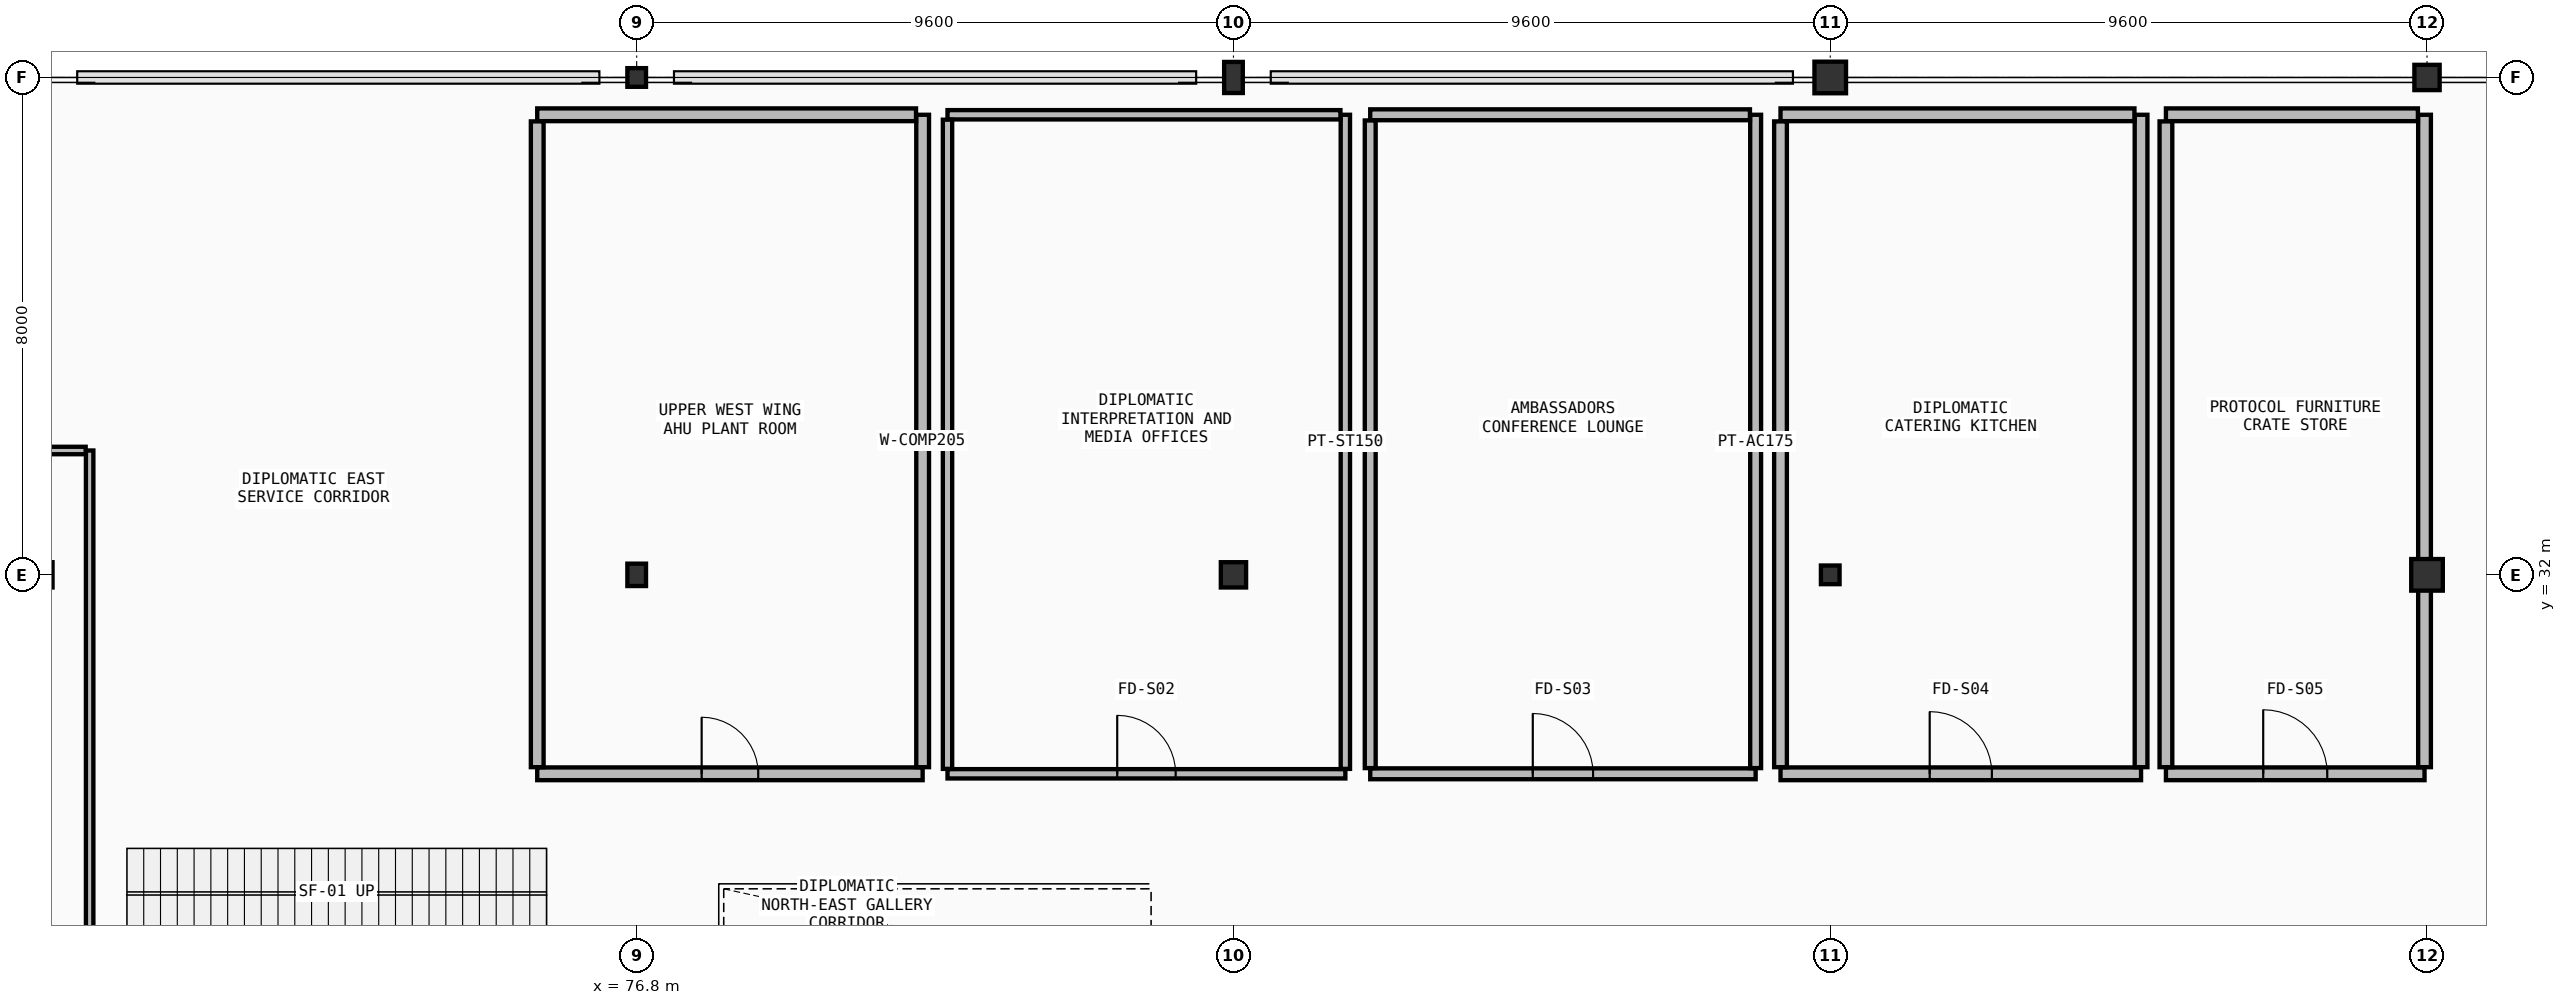
"""IFC4 building model, lengths in metres.
Left out: names, types, materials, properties, quantities, classifications, styles, units other than length and angle.
Written with IfcOpenShell. Run it as: python <this file> out.ifc"""

import sys

from ifc_helpers import new_model, si_unit, direction, frame, frame_2d, origin, origin_2d, place, context, subcontext, project, spatial, rectangle, hollow_circle, i_section, extrude, element, fill, save


model = new_model("IFC4")
c1 = context("Model", 3, precision=1e-05, world=origin(), true_north=direction((0.0, 1.0)))
c2 = subcontext(c1, "Body", "Model", "MODEL_VIEW")
j1 = project(units=[si_unit("LENGTHUNIT", "METRE"), si_unit("PLANEANGLEUNIT", "RADIAN")], contexts=[c1])
p1 = place(None, origin())
s1 = spatial("IfcSite", under=j1, at=p1, CompositionType="ELEMENT")
p2 = place(p1, origin())
s2 = spatial("IfcBuilding", under=s1, at=p2, CompositionType="ELEMENT")
p3 = place(p2, frame((0.0, 0.0, 20.4)))
s3 = spatial("IfcBuildingStorey", under=s2, at=p3, CompositionType="ELEMENT", Elevation=20.4)
p4 = place(p3, frame((67.2, 32.0, 0.0), z_axis=(0.0, 0.0, 1.0), x_axis=(1.0, 0.0, 0.0)))
e1 = element("IfcColumn", 1, at=p4, inside=s3, PredefinedType="COLUMN", context=c2, shape_type="SweptSolid", body=[
    extrude(hollow_circle(Radius=0.203, WallThickness=0.02, at=origin_2d()), origin(), (0.0, 0.0, 1.0), 4.5),
])
p5 = place(p3, frame((76.8, 32.0, 0.0), z_axis=(0.0, 0.0, 1.0), x_axis=(1.0, 0.0, 0.0)))
e2 = element("IfcColumn", 2, at=p5, inside=s3, PredefinedType="COLUMN", context=c2, shape_type="SweptSolid", body=[
    extrude(i_section(OverallWidth=0.3, OverallDepth=0.36, WebThickness=0.012, FlangeThickness=0.022, FilletRadius=0.027, at=origin_2d()), origin(), (0.0, 0.0, 1.0), 4.5),
])
p6 = place(p3, frame((76.8, 40.0, 0.0), z_axis=(0.0, 0.0, 1.0), x_axis=(1.0, 0.0, 0.0)))
e3 = element("IfcColumn", 3, at=p6, inside=s3, PredefinedType="COLUMN", context=c2, shape_type="SweptSolid", body=[
    extrude(i_section(OverallWidth=0.3, OverallDepth=0.3, WebThickness=0.011, FlangeThickness=0.019, FilletRadius=0.027, at=origin_2d()), origin(), (0.0, 0.0, 1.0), 4.5),
])
p7 = place(p3, frame((86.4, 32.0, 0.0), z_axis=(0.0, 0.0, 1.0), x_axis=(1.0, 0.0, 0.0)))
e4 = element("IfcColumn", 4, at=p7, inside=s3, PredefinedType="COLUMN", context=c2, shape_type="SweptSolid", body=[
    extrude(hollow_circle(Radius=0.203, WallThickness=0.02, at=origin_2d()), origin(), (0.0, 0.0, 1.0), 4.5),
])
p8 = place(p3, frame((86.4, 40.0, 0.0), z_axis=(0.0, 0.0, 1.0), x_axis=(1.0, 0.0, 0.0)))
e5 = element("IfcColumn", 5, at=p8, inside=s3, PredefinedType="COLUMN", context=c2, shape_type="SweptSolid", body=[
    extrude(i_section(OverallWidth=0.3, OverallDepth=0.5, WebThickness=0.014, FlangeThickness=0.028, FilletRadius=0.027, at=origin_2d()), origin(), (0.0, 0.0, 1.0), 4.5),
])
p9 = place(p3, frame((96.0, 32.0, 0.0), z_axis=(0.0, 0.0, 1.0), x_axis=(1.0, 0.0, 0.0)))
e6 = element("IfcColumn", 6, at=p9, inside=s3, PredefinedType="COLUMN", context=c2, shape_type="SweptSolid", body=[
    extrude(i_section(OverallWidth=0.3, OverallDepth=0.3, WebThickness=0.011, FlangeThickness=0.019, FilletRadius=0.027, at=origin_2d()), origin(), (0.0, 0.0, 1.0), 4.5),
])
for number, where, z_axis, x_axis in (
    (7, (96.0, 40.0, 0.0), (0.0, 0.0, 1.0), (1.0, 0.0, 0.0)),
    (8, (105.6, 32.0, 0.0), (0.0, 0.0, 1.0), (1.0, 0.0, 0.0)),
):
    element("IfcColumn", number, at=place(p3, frame(where, z_axis=z_axis, x_axis=x_axis)), inside=s3, PredefinedType="COLUMN", context=c2, shape_type="SweptSolid", body=[
        extrude(hollow_circle(Radius=0.254, WallThickness=0.025, at=origin_2d()), origin(), (0.0, 0.0, 1.0), 4.5),
    ])
p10 = place(p3, frame((105.6, 40.0, 0.0), z_axis=(0.0, 0.0, 1.0), x_axis=(1.0, 0.0, 0.0)))
e9 = element("IfcColumn", 9, at=p10, inside=s3, PredefinedType="COLUMN", context=c2, shape_type="SweptSolid", body=[
    extrude(hollow_circle(Radius=0.203, WallThickness=0.02, at=origin_2d()), origin(), (0.0, 0.0, 1.0), 4.5),
])
p11 = place(p3, frame((75.2, 28.8, 0.0), z_axis=(0.0, 0.0, 1.0), x_axis=(1.0, 0.0, 0.0)))
e10 = element("IfcWall", 10, at=p11, inside=s3, PredefinedType="SOLIDWALL", context=c2, shape_type="SweptSolid", body=[
    extrude(rectangle(XDim=6.2, YDim=0.205, at=frame_2d((3.1, 0.0))), origin(), (0.0, 0.0, 1.0), 3.67),
])
p12 = place(p11, frame((2.645, 0.0, 0.0)))
e11 = element("IfcOpeningElement", 11, at=p12, cuts=e10, PredefinedType="OPENING", context=c2, shape_type="SweptSolid", body=[
    extrude(rectangle(XDim=0.91, YDim=2.08, at=frame_2d((0.455, 1.04))), frame((0.0, 0.113, 0.0), z_axis=(0.0, -1.0, 0.0), x_axis=(1.0, 0.0, 0.0)), (0.0, 0.0, 1.0), 0.225),
])
p13 = place(p3, frame((81.4, 28.906, 0.0), z_axis=(0.0, 0.0, 1.0), x_axis=(0.0, 1.0, 0.0)))
e12 = element("IfcWall", 12, at=p13, inside=s3, PredefinedType="SOLIDWALL", context=c2, shape_type="SweptSolid", body=[
    extrude(rectangle(XDim=10.493, YDim=0.205, at=frame_2d((5.247, 0.0))), origin(), (0.0, 0.0, 1.0), 3.63),
])
p14 = place(p3, frame((81.293, 39.4, 0.0), z_axis=(0.0, 0.0, 1.0), x_axis=(-1.0, 0.0, 0.0)))
e13 = element("IfcWall", 13, at=p14, inside=s3, PredefinedType="SOLIDWALL", context=c2, shape_type="SweptSolid", body=[
    extrude(rectangle(XDim=6.094, YDim=0.205, at=frame_2d((3.047, 0.0))), origin(), (0.0, 0.0, 1.0), 3.32),
])
p15 = place(p3, frame((75.2, 39.293, 0.0), z_axis=(0.0, 0.0, 1.0), x_axis=(0.0, -1.0, 0.0)))
e14 = element("IfcWall", 14, at=p15, inside=s3, PredefinedType="SOLIDWALL", context=c2, shape_type="SweptSolid", body=[
    extrude(rectangle(XDim=10.387, YDim=0.205, at=frame_2d((5.193, 0.0))), origin(), (0.0, 0.0, 1.0), 3.77),
])
p16 = place(p3, frame((81.8, 28.8, 0.0), z_axis=(0.0, 0.0, 1.0), x_axis=(1.0, 0.0, 0.0)))
e15 = element("IfcWall", 15, at=p16, inside=s3, PredefinedType="PARTITIONING", context=c2, shape_type="SweptSolid", body=[
    extrude(rectangle(XDim=6.4, YDim=0.15, at=frame_2d((3.2, 0.0))), origin(), (0.0, 0.0, 1.0), 3.32),
])
p17 = place(p16, frame((2.73, 0.0, 0.0)))
e16 = element("IfcOpeningElement", 16, at=p17, cuts=e15, PredefinedType="OPENING", context=c2, shape_type="SweptSolid", body=[
    extrude(rectangle(XDim=0.94, YDim=2.1, at=frame_2d((0.47, 1.05))), frame((0.0, 0.085, 0.0), z_axis=(0.0, -1.0, 0.0), x_axis=(1.0, 0.0, 0.0)), (0.0, 0.0, 1.0), 0.17),
])
p18 = place(p3, frame((88.2, 28.879, 0.0), z_axis=(0.0, 0.0, 1.0), x_axis=(0.0, 1.0, 0.0)))
e17 = element("IfcWall", 17, at=p18, inside=s3, PredefinedType="PARTITIONING", context=c2, shape_type="SweptSolid", body=[
    extrude(rectangle(XDim=10.521, YDim=0.15, at=frame_2d((5.26, 0.0))), origin(), (0.0, 0.0, 1.0), 3.73),
])
p19 = place(p3, frame((88.121, 39.4, 0.0), z_axis=(0.0, 0.0, 1.0), x_axis=(-1.0, 0.0, 0.0)))
e18 = element("IfcWall", 18, at=p19, inside=s3, PredefinedType="PARTITIONING", context=c2, shape_type="SweptSolid", body=[
    extrude(rectangle(XDim=6.321, YDim=0.15, at=frame_2d((3.161, 0.0))), origin(), (0.0, 0.0, 1.0), 3.52),
])
p20 = place(p3, frame((81.8, 39.321, 0.0), z_axis=(0.0, 0.0, 1.0), x_axis=(0.0, -1.0, 0.0)))
e19 = element("IfcWall", 19, at=p20, inside=s3, PredefinedType="PARTITIONING", context=c2, shape_type="SweptSolid", body=[
    extrude(rectangle(XDim=10.442, YDim=0.15, at=frame_2d((5.221, 0.0))), origin(), (0.0, 0.0, 1.0), 3.63),
])
p21 = place(p3, frame((88.6, 28.8, 0.0), z_axis=(0.0, 0.0, 1.0), x_axis=(1.0, 0.0, 0.0)))
e20 = element("IfcWall", 20, at=p21, inside=s3, PredefinedType="PARTITIONING", context=c2, shape_type="SweptSolid", body=[
    extrude(rectangle(XDim=6.2, YDim=0.175, at=frame_2d((3.1, 0.0))), origin(), (0.0, 0.0, 1.0), 4.25),
])
p22 = place(p21, frame((2.615, 0.0, 0.0)))
e21 = element("IfcOpeningElement", 21, at=p22, cuts=e20, PredefinedType="OPENING", context=c2, shape_type="SweptSolid", body=[
    extrude(rectangle(XDim=0.97, YDim=2.1, at=frame_2d((0.485, 1.05))), frame((0.0, 0.097, 0.0), z_axis=(0.0, -1.0, 0.0), x_axis=(1.0, 0.0, 0.0)), (0.0, 0.0, 1.0), 0.195),
])
p23 = place(p3, frame((94.8, 28.892, 0.0), z_axis=(0.0, 0.0, 1.0), x_axis=(0.0, 1.0, 0.0)))
e22 = element("IfcWall", 22, at=p23, inside=s3, PredefinedType="PARTITIONING", context=c2, shape_type="SweptSolid", body=[
    extrude(rectangle(XDim=10.508, YDim=0.175, at=frame_2d((5.254, 0.0))), origin(), (0.0, 0.0, 1.0), 3.73),
])
p24 = place(p3, frame((94.708, 39.4, 0.0), z_axis=(0.0, 0.0, 1.0), x_axis=(-1.0, 0.0, 0.0)))
e23 = element("IfcWall", 23, at=p24, inside=s3, PredefinedType="PARTITIONING", context=c2, shape_type="SweptSolid", body=[
    extrude(rectangle(XDim=6.108, YDim=0.175, at=frame_2d((3.054, 0.0))), origin(), (0.0, 0.0, 1.0), 4.25),
])
p25 = place(p3, frame((88.6, 39.309, 0.0), z_axis=(0.0, 0.0, 1.0), x_axis=(0.0, -1.0, 0.0)))
e24 = element("IfcWall", 24, at=p25, inside=s3, PredefinedType="PARTITIONING", context=c2, shape_type="SweptSolid", body=[
    extrude(rectangle(XDim=10.417, YDim=0.175, at=frame_2d((5.208, 0.0))), origin(), (0.0, 0.0, 1.0), 3.73),
])
p26 = place(p3, frame((95.2, 28.8, 0.0), z_axis=(0.0, 0.0, 1.0), x_axis=(1.0, 0.0, 0.0)))
e25 = element("IfcWall", 25, at=p26, inside=s3, PredefinedType="SOLIDWALL", context=c2, shape_type="SweptSolid", body=[
    extrude(rectangle(XDim=5.8, YDim=0.205, at=frame_2d((2.9, 0.0))), origin(), (0.0, 0.0, 1.0), 3.52),
])
p27 = place(p26, frame((2.4, 0.0, 0.0)))
e26 = element("IfcOpeningElement", 26, at=p27, cuts=e25, PredefinedType="OPENING", context=c2, shape_type="SweptSolid", body=[
    extrude(rectangle(XDim=1.0, YDim=2.12, at=frame_2d((0.5, 1.06))), frame((0.0, 0.113, 0.0), z_axis=(0.0, -1.0, 0.0), x_axis=(1.0, 0.0, 0.0)), (0.0, 0.0, 1.0), 0.225),
])
p28 = place(p3, frame((101.0, 28.906, 0.0), z_axis=(0.0, 0.0, 1.0), x_axis=(0.0, 1.0, 0.0)))
e27 = element("IfcWall", 27, at=p28, inside=s3, PredefinedType="SOLIDWALL", context=c2, shape_type="SweptSolid", body=[
    extrude(rectangle(XDim=10.493, YDim=0.205, at=frame_2d((5.247, 0.0))), origin(), (0.0, 0.0, 1.0), 3.84),
])
p29 = place(p3, frame((100.894, 39.4, 0.0), z_axis=(0.0, 0.0, 1.0), x_axis=(-1.0, 0.0, 0.0)))
e28 = element("IfcWall", 28, at=p29, inside=s3, PredefinedType="SOLIDWALL", context=c2, shape_type="SweptSolid", body=[
    extrude(rectangle(XDim=5.694, YDim=0.205, at=frame_2d((2.847, 0.0))), origin(), (0.0, 0.0, 1.0), 3.62),
])
p30 = place(p3, frame((95.2, 39.293, 0.0), z_axis=(0.0, 0.0, 1.0), x_axis=(0.0, -1.0, 0.0)))
e29 = element("IfcWall", 29, at=p30, inside=s3, PredefinedType="SOLIDWALL", context=c2, shape_type="SweptSolid", body=[
    extrude(rectangle(XDim=10.387, YDim=0.205, at=frame_2d((5.193, 0.0))), origin(), (0.0, 0.0, 1.0), 3.73),
])
p31 = place(p3, frame((101.4, 28.8, 0.0), z_axis=(0.0, 0.0, 1.0), x_axis=(1.0, 0.0, 0.0)))
e30 = element("IfcWall", 30, at=p31, inside=s3, PredefinedType="SOLIDWALL", context=c2, shape_type="SweptSolid", body=[
    extrude(rectangle(XDim=4.16, YDim=0.205, at=frame_2d((2.08, 0.0))), origin(), (0.0, 0.0, 1.0), 3.83),
])
p32 = place(p31, frame((1.565, 0.0, 0.0)))
e31 = element("IfcOpeningElement", 31, at=p32, cuts=e30, PredefinedType="OPENING", context=c2, shape_type="SweptSolid", body=[
    extrude(rectangle(XDim=1.03, YDim=2.14, at=frame_2d((0.515, 1.07))), frame((0.0, 0.113, 0.0), z_axis=(0.0, -1.0, 0.0), x_axis=(1.0, 0.0, 0.0)), (0.0, 0.0, 1.0), 0.225),
])
p33 = place(p3, frame((105.56, 28.906, 0.0), z_axis=(0.0, 0.0, 1.0), x_axis=(0.0, 1.0, 0.0)))
e32 = element("IfcWall", 32, at=p33, inside=s3, PredefinedType="SOLIDWALL", context=c2, shape_type="SweptSolid", body=[
    extrude(rectangle(XDim=10.493, YDim=0.205, at=frame_2d((5.247, 0.0))), origin(), (0.0, 0.0, 1.0), 3.78),
])
p34 = place(p3, frame((105.454, 39.4, 0.0), z_axis=(0.0, 0.0, 1.0), x_axis=(-1.0, 0.0, 0.0)))
e33 = element("IfcWall", 33, at=p34, inside=s3, PredefinedType="SOLIDWALL", context=c2, shape_type="SweptSolid", body=[
    extrude(rectangle(XDim=4.054, YDim=0.205, at=frame_2d((2.027, 0.0))), origin(), (0.0, 0.0, 1.0), 4.26),
])
p35 = place(p3, frame((101.4, 39.293, 0.0), z_axis=(0.0, 0.0, 1.0), x_axis=(0.0, -1.0, 0.0)))
e34 = element("IfcWall", 34, at=p35, inside=s3, PredefinedType="SOLIDWALL", context=c2, shape_type="SweptSolid", body=[
    extrude(rectangle(XDim=10.387, YDim=0.205, at=frame_2d((5.193, 0.0))), origin(), (0.0, 0.0, 1.0), 3.84),
])
p36 = place(p3, frame((68.0, 24.664, 0.0), z_axis=(0.0, 0.0, 1.0), x_axis=(0.0, 1.0, 0.0)))
e35 = element("IfcWall", 35, at=p36, inside=s3, PredefinedType="PARTITIONING", context=c2, shape_type="SweptSolid", body=[
    extrude(rectangle(XDim=9.336, YDim=0.12, at=frame_2d((4.668, 0.0))), origin(), (0.0, 0.0, 1.0), 3.77),
])
p37 = place(p3, frame((67.936, 34.0, 0.0), z_axis=(0.0, 0.0, 1.0), x_axis=(-1.0, 0.0, 0.0)))
e36 = element("IfcWall", 36, at=p37, inside=s3, PredefinedType="PARTITIONING", context=c2, shape_type="SweptSolid", body=[
    extrude(rectangle(XDim=7.072, YDim=0.12, at=frame_2d((3.536, 0.0))), origin(), (0.0, 0.0, 1.0), 3.67),
])
p38 = place(p12, origin())
e37 = element("IfcDoor", 37, at=p38, inside=s3, OperationType="SINGLE_SWING_RIGHT", PredefinedType="DOOR", context=c2, shape_type="SweptSolid", body=[
    extrude(rectangle(XDim=0.91, YDim=2.08, at=frame_2d((0.455, 1.04))), frame((0.0, 0.025, 0.0), z_axis=(0.0, -1.0, 0.0), x_axis=(1.0, 0.0, 0.0)), (0.0, 0.0, 1.0), 0.05),
])
fill(e11, e37)
p39 = place(p17, origin())
e38 = element("IfcDoor", 38, at=p39, inside=s3, OperationType="SINGLE_SWING_LEFT", PredefinedType="DOOR", context=c2, shape_type="SweptSolid", body=[
    extrude(rectangle(XDim=0.94, YDim=2.1, at=frame_2d((0.47, 1.05))), frame((0.0, 0.025, 0.0), z_axis=(0.0, -1.0, 0.0), x_axis=(1.0, 0.0, 0.0)), (0.0, 0.0, 1.0), 0.05),
])
fill(e16, e38)
p40 = place(p22, origin())
e39 = element("IfcDoor", 39, at=p40, inside=s3, OperationType="SINGLE_SWING_RIGHT", PredefinedType="DOOR", context=c2, shape_type="SweptSolid", body=[
    extrude(rectangle(XDim=0.97, YDim=2.1, at=frame_2d((0.485, 1.05))), frame((0.0, 0.025, 0.0), z_axis=(0.0, -1.0, 0.0), x_axis=(1.0, 0.0, 0.0)), (0.0, 0.0, 1.0), 0.05),
])
fill(e21, e39)
p41 = place(p27, origin())
e40 = element("IfcDoor", 40, at=p41, inside=s3, OperationType="SINGLE_SWING_LEFT", PredefinedType="DOOR", context=c2, shape_type="SweptSolid", body=[
    extrude(rectangle(XDim=1.0, YDim=2.12, at=frame_2d((0.5, 1.06))), frame((0.0, 0.025, 0.0), z_axis=(0.0, -1.0, 0.0), x_axis=(1.0, 0.0, 0.0)), (0.0, 0.0, 1.0), 0.05),
])
fill(e26, e40)
p42 = place(p32, origin())
e41 = element("IfcDoor", 41, at=p42, inside=s3, OperationType="SINGLE_SWING_RIGHT", PredefinedType="DOOR", context=c2, shape_type="SweptSolid", body=[
    extrude(rectangle(XDim=1.03, YDim=2.14, at=frame_2d((0.515, 1.07))), frame((0.0, 0.025, 0.0), z_axis=(0.0, -1.0, 0.0), x_axis=(1.0, 0.0, 0.0)), (0.0, 0.0, 1.0), 0.05),
])
fill(e31, e41)
save(model, sys.argv[1])
